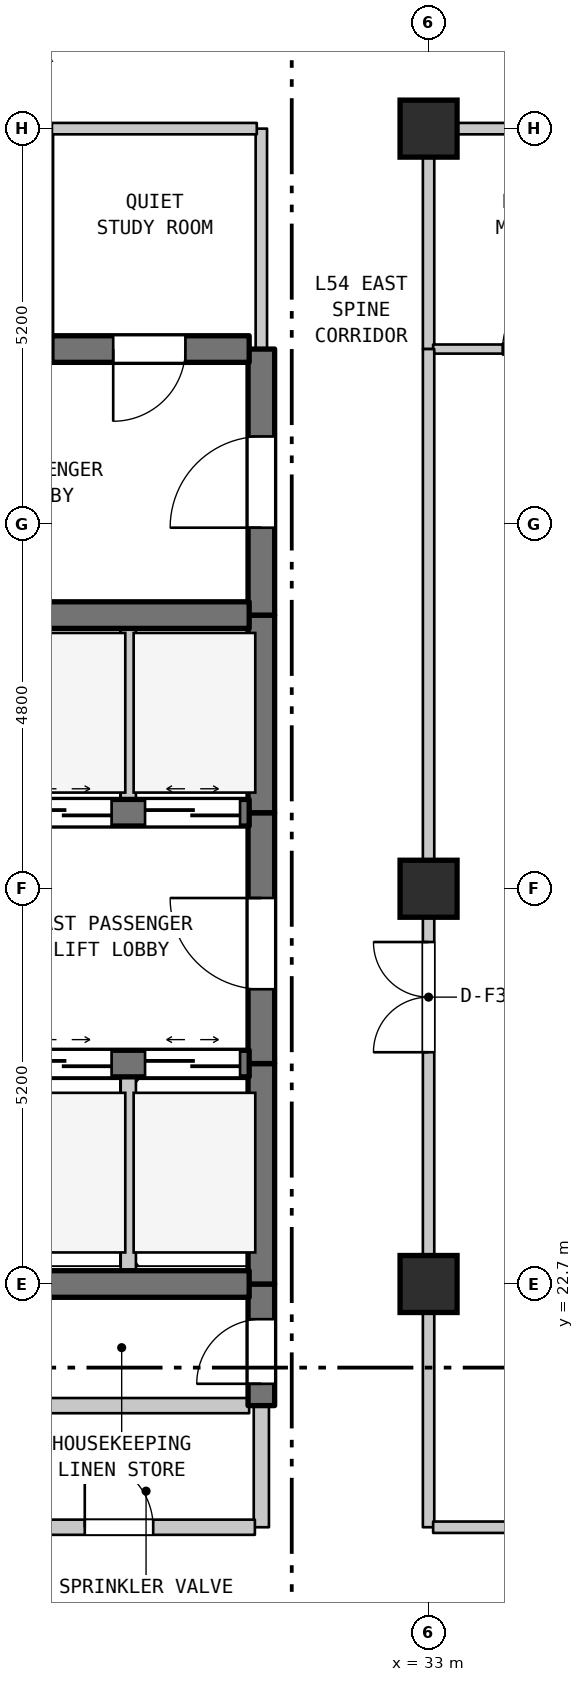
"""IFC4 building model, lengths in metres.
Left out: names, types, materials, properties, quantities, classifications, styles, units other than length and angle.
Written with IfcOpenShell. Run it as: python <this file> out.ifc"""

import sys

from ifc_helpers import new_model, si_unit, direction, frame, frame_2d, origin, origin_2d, place, context, subcontext, project, spatial, rectangle, extrude, element, fill, save


model = new_model("IFC4")
c1 = context("Model", 3, precision=1e-05, world=origin(), true_north=direction((0.0, 1.0)))
c2 = subcontext(c1, "Body", "Model", "MODEL_VIEW")
j1 = project(units=[si_unit("LENGTHUNIT", "METRE"), si_unit("PLANEANGLEUNIT", "RADIAN")], contexts=[c1])
p1 = place(None, origin())
s1 = spatial("IfcSite", under=j1, at=p1, CompositionType="ELEMENT")
p2 = place(p1, origin())
s2 = spatial("IfcBuilding", under=s1, at=p2, CompositionType="ELEMENT")
p3 = place(p2, frame((0.0, 0.0, 218.0)))
s3 = spatial("IfcBuildingStorey", under=s2, at=p3, CompositionType="ELEMENT", Elevation=218.0)
for number, where, z_axis, x_axis in (
    (1, (33.0, 22.7, 0.0), (0.0, 0.0, 1.0), (1.0, 0.0, 0.0)),
    (2, (33.0, 27.9, 0.0), (0.0, 0.0, 1.0), (1.0, 0.0, 0.0)),
    (3, (33.0, 37.9, 0.0), (0.0, 0.0, 1.0), (1.0, 0.0, 0.0)),
):
    element("IfcColumn", number, at=place(p3, frame(where, z_axis=z_axis, x_axis=x_axis)), inside=s3, PredefinedType="COLUMN", context=c2, shape_type="SweptSolid", body=[
        extrude(rectangle(XDim=0.75, YDim=0.75, at=origin_2d()), origin(), (0.0, 0.0, 1.0), 4.8),
    ])
p4 = place(p3, frame((28.0, 35.0, 0.0), z_axis=(0.0, 0.0, 1.0), x_axis=(0.0, 1.0, 0.0)))
e4 = element("IfcWall", 4, at=p4, inside=s3, PredefinedType="PARTITIONING", context=c2, shape_type="SweptSolid", body=[
    extrude(rectangle(XDim=2.9, YDim=0.12, at=frame_2d((1.45, 0.0))), origin(), (0.0, 0.0, 1.0), 4.49),
])
p5 = place(p3, frame((29.05, 22.7, 0.0), z_axis=(0.0, 0.0, 1.0), x_axis=(0.0, 1.0, 0.0)))
e5 = element("IfcWall", 5, at=p5, inside=s3, PredefinedType="STANDARD", context=c2, shape_type="SweptSolid", body=[
    extrude(rectangle(XDim=2.9, YDim=0.2, at=frame_2d((1.45, 0.0))), origin(), (0.0, 0.0, 1.0), 4.49),
])
p6 = place(p3, frame((29.05, 28.9, 0.0), z_axis=(0.0, 0.0, 1.0), x_axis=(0.0, 1.0, 0.0)))
e6 = element("IfcWall", 6, at=p6, inside=s3, PredefinedType="STANDARD", context=c2, shape_type="SweptSolid", body=[
    extrude(rectangle(XDim=2.6, YDim=0.2, at=frame_2d((1.3, 0.0))), origin(), (0.0, 0.0, 1.0), 4.49),
])
p7 = place(p3, frame((30.8, 19.5, 0.0), z_axis=(0.0, 0.0, 1.0), x_axis=(0.0, 1.0, 0.0)))
e7 = element("IfcWall", 7, at=p7, inside=s3, PredefinedType="STANDARD", context=c2, shape_type="SweptSolid", body=[
    extrude(rectangle(XDim=1.6, YDim=0.2, at=frame_2d((0.8, 0.0))), origin(), (0.0, 0.0, 1.0), 4.49),
])
p8 = place(p3, frame((30.8, 21.1, 0.0), z_axis=(0.0, 0.0, 1.0), x_axis=(0.0, 1.0, 0.0)))
e8 = element("IfcWall", 8, at=p8, inside=s3, PredefinedType="SHEAR", context=c2, shape_type="SweptSolid", body=[
    extrude(rectangle(XDim=1.6, YDim=0.35, at=frame_2d((0.8, 0.0))), origin(), (0.0, 0.0, 1.0), 4.49),
])
p9 = place(p8, frame((0.287, 0.0, 0.0)))
e9 = element("IfcOpeningElement", 9, at=p9, cuts=e8, PredefinedType="OPENING", context=c2, shape_type="SweptSolid", body=[
    extrude(rectangle(XDim=0.85, YDim=2.1, at=frame_2d((0.425, 1.05))), frame((0.0, 0.185, 0.0), z_axis=(0.0, -1.0, 0.0), x_axis=(1.0, 0.0, 0.0)), (0.0, 0.0, 1.0), 0.37),
])
p10 = place(p3, frame((30.8, 22.7, 0.0), z_axis=(0.0, 0.0, 1.0), x_axis=(0.0, 1.0, 0.0)))
e10 = element("IfcWall", 10, at=p10, inside=s3, PredefinedType="SHEAR", context=c2, shape_type="SweptSolid", body=[
    extrude(rectangle(XDim=2.9, YDim=0.35, at=frame_2d((1.45, 0.0))), origin(), (0.0, 0.0, 1.0), 4.49),
])
p11 = place(p3, frame((30.8, 25.6, 0.0), z_axis=(0.0, 0.0, 1.0), x_axis=(0.0, 1.0, 0.0)))
e11 = element("IfcWall", 11, at=p11, inside=s3, PredefinedType="SHEAR", context=c2, shape_type="SweptSolid", body=[
    extrude(rectangle(XDim=3.3, YDim=0.35, at=frame_2d((1.65, 0.0))), origin(), (0.0, 0.0, 1.0), 4.49),
])
p12 = place(p11, frame((0.978, 0.0, 0.0)))
e12 = element("IfcOpeningElement", 12, at=p12, cuts=e11, PredefinedType="OPENING", context=c2, shape_type="SweptSolid", body=[
    extrude(rectangle(XDim=1.2, YDim=2.2, at=frame_2d((0.6, 1.1))), frame((0.0, 0.185, 0.0), z_axis=(0.0, -1.0, 0.0), x_axis=(1.0, 0.0, 0.0)), (0.0, 0.0, 1.0), 0.37),
])
p13 = place(p3, frame((30.8, 28.9, 0.0), z_axis=(0.0, 0.0, 1.0), x_axis=(0.0, 1.0, 0.0)))
e13 = element("IfcWall", 13, at=p13, inside=s3, PredefinedType="SHEAR", context=c2, shape_type="SweptSolid", body=[
    extrude(rectangle(XDim=2.6, YDim=0.35, at=frame_2d((1.3, 0.0))), origin(), (0.0, 0.0, 1.0), 4.49),
])
p14 = place(p3, frame((30.8, 31.5, 0.0), z_axis=(0.0, 0.0, 1.0), x_axis=(0.0, 1.0, 0.0)))
e14 = element("IfcWall", 14, at=p14, inside=s3, PredefinedType="SHEAR", context=c2, shape_type="SweptSolid", body=[
    extrude(rectangle(XDim=3.5, YDim=0.35, at=frame_2d((1.75, 0.0))), origin(), (0.0, 0.0, 1.0), 4.49),
])
p15 = place(p14, frame((1.15, 0.0, 0.0)))
e15 = element("IfcOpeningElement", 15, at=p15, cuts=e14, PredefinedType="OPENING", context=c2, shape_type="SweptSolid", body=[
    extrude(rectangle(XDim=1.2, YDim=2.2, at=frame_2d((0.6, 1.1))), frame((0.0, 0.185, 0.0), z_axis=(0.0, -1.0, 0.0), x_axis=(1.0, 0.0, 0.0)), (0.0, 0.0, 1.0), 0.37),
])
p16 = place(p3, frame((30.8, 35.0, 0.0), z_axis=(0.0, 0.0, 1.0), x_axis=(0.0, 1.0, 0.0)))
e16 = element("IfcWall", 16, at=p16, inside=s3, PredefinedType="STANDARD", context=c2, shape_type="SweptSolid", body=[
    extrude(rectangle(XDim=2.9, YDim=0.15, at=frame_2d((1.45, 0.0))), origin(), (0.0, 0.0, 1.0), 4.49),
])
p17 = place(p3, frame((33.0, 19.5, 0.0), z_axis=(0.0, 0.0, 1.0), x_axis=(0.0, 1.0, 0.0)))
e17 = element("IfcWall", 17, at=p17, inside=s3, PredefinedType="STANDARD", context=c2, shape_type="SweptSolid", body=[
    extrude(rectangle(XDim=8.4, YDim=0.15, at=frame_2d((4.2, 0.0))), origin(), (0.0, 0.0, 1.0), 4.09),
])
p18 = place(p17, frame((6.249, 0.0, 0.0)))
e18 = element("IfcOpeningElement", 18, at=p18, cuts=e17, PredefinedType="OPENING", context=c2, shape_type="SweptSolid", body=[
    extrude(rectangle(XDim=1.45, YDim=2.2, at=frame_2d((0.725, 1.1))), frame((0.0, 0.085, 0.0), z_axis=(0.0, -1.0, 0.0), x_axis=(1.0, 0.0, 0.0)), (0.0, 0.0, 1.0), 0.17),
])
p19 = place(p3, frame((33.0, 35.0, 0.0), z_axis=(0.0, 0.0, 1.0), x_axis=(0.0, 1.0, 0.0)))
e19 = element("IfcWall", 19, at=p19, inside=s3, PredefinedType="STANDARD", context=c2, shape_type="SweptSolid", body=[
    extrude(rectangle(XDim=2.9, YDim=0.15, at=frame_2d((1.45, 0.0))), origin(), (0.0, 0.0, 1.0), 3.99),
])
p20 = place(p3, frame((27.285, 19.5, 0.0), z_axis=(0.0, 0.0, 1.0), x_axis=(1.0, 0.0, 0.0)))
e20 = element("IfcWall", 20, at=p20, inside=s3, PredefinedType="STANDARD", context=c2, shape_type="SweptSolid", body=[
    extrude(rectangle(XDim=3.43, YDim=0.2, at=frame_2d((1.715, 0.0))), origin(), (0.0, 0.0, 1.0), 4.49),
])
p21 = place(p20, frame((1.192, 0.0, 0.0)))
e21 = element("IfcOpeningElement", 21, at=p21, cuts=e20, PredefinedType="OPENING", context=c2, shape_type="SweptSolid", body=[
    extrude(rectangle(XDim=0.9, YDim=2.15, at=frame_2d((0.45, 1.075))), frame((0.0, 0.11, 0.0), z_axis=(0.0, -1.0, 0.0), x_axis=(1.0, 0.0, 0.0)), (0.0, 0.0, 1.0), 0.22),
])
p22 = place(p3, frame((33.06, 19.5, 0.0), z_axis=(0.0, 0.0, 1.0), x_axis=(1.0, 0.0, 0.0)))
e22 = element("IfcWall", 22, at=p22, inside=s3, PredefinedType="STANDARD", context=c2, shape_type="SweptSolid", body=[
    extrude(rectangle(XDim=21.58, YDim=0.15, at=frame_2d((10.79, 0.0))), origin(), (0.0, 0.0, 1.0), 4.49),
])
p23 = place(p3, frame((27.285, 21.1, 0.0), z_axis=(0.0, 0.0, 1.0), x_axis=(1.0, 0.0, 0.0)))
e23 = element("IfcWall", 23, at=p23, inside=s3, PredefinedType="STANDARD", context=c2, shape_type="SweptSolid", body=[
    extrude(rectangle(XDim=3.355, YDim=0.2, at=frame_2d((1.677, 0.0))), origin(), (0.0, 0.0, 1.0), 4.49),
])
p24 = place(p3, frame((27.46, 22.7, 0.0), z_axis=(0.0, 0.0, 1.0), x_axis=(1.0, 0.0, 0.0)))
e24 = element("IfcWall", 24, at=p24, inside=s3, PredefinedType="SHEAR", context=c2, shape_type="SweptSolid", body=[
    extrude(rectangle(XDim=3.18, YDim=0.35, at=frame_2d((1.59, 0.0))), origin(), (0.0, 0.0, 1.0), 4.49),
])
p25 = place(p3, frame((27.46, 25.6, 0.0), z_axis=(0.0, 0.0, 1.0), x_axis=(1.0, 0.0, 0.0)))
e25 = element("IfcWall", 25, at=p25, inside=s3, PredefinedType="SHEAR", context=c2, shape_type="SweptSolid", body=[
    extrude(rectangle(XDim=3.18, YDim=0.35, at=frame_2d((1.59, 0.0))), origin(), (0.0, 0.0, 1.0), 4.49),
])
p26 = place(p25, frame((0.12, 0.0, 0.0)))
e26 = element("IfcOpeningElement", 26, at=p26, cuts=e25, PredefinedType="OPENING", context=c2, shape_type="SweptSolid", body=[
    extrude(rectangle(XDim=1.25, YDim=2.2, at=frame_2d((0.625, 1.1))), frame((0.0, 0.185, 0.0), z_axis=(0.0, -1.0, 0.0), x_axis=(1.0, 0.0, 0.0)), (0.0, 0.0, 1.0), 0.37),
])
p27 = place(p25, frame((1.81, 0.0, 0.0)))
e27 = element("IfcOpeningElement", 27, at=p27, cuts=e25, PredefinedType="OPENING", context=c2, shape_type="SweptSolid", body=[
    extrude(rectangle(XDim=1.25, YDim=2.2, at=frame_2d((0.625, 1.1))), frame((0.0, 0.185, 0.0), z_axis=(0.0, -1.0, 0.0), x_axis=(1.0, 0.0, 0.0)), (0.0, 0.0, 1.0), 0.37),
])
p28 = place(p3, frame((27.46, 28.9, 0.0), z_axis=(0.0, 0.0, 1.0), x_axis=(1.0, 0.0, 0.0)))
e28 = element("IfcWall", 28, at=p28, inside=s3, PredefinedType="SHEAR", context=c2, shape_type="SweptSolid", body=[
    extrude(rectangle(XDim=3.18, YDim=0.35, at=frame_2d((1.59, 0.0))), origin(), (0.0, 0.0, 1.0), 4.49),
])
p29 = place(p28, frame((0.12, 0.0, 0.0)))
e29 = element("IfcOpeningElement", 29, at=p29, cuts=e28, PredefinedType="OPENING", context=c2, shape_type="SweptSolid", body=[
    extrude(rectangle(XDim=1.25, YDim=2.2, at=frame_2d((0.625, 1.1))), frame((0.0, 0.185, 0.0), z_axis=(0.0, -1.0, 0.0), x_axis=(1.0, 0.0, 0.0)), (0.0, 0.0, 1.0), 0.37),
])
p30 = place(p28, frame((1.81, 0.0, 0.0)))
e30 = element("IfcOpeningElement", 30, at=p30, cuts=e28, PredefinedType="OPENING", context=c2, shape_type="SweptSolid", body=[
    extrude(rectangle(XDim=1.25, YDim=2.2, at=frame_2d((0.625, 1.1))), frame((0.0, 0.185, 0.0), z_axis=(0.0, -1.0, 0.0), x_axis=(1.0, 0.0, 0.0)), (0.0, 0.0, 1.0), 0.37),
])
p31 = place(p3, frame((27.46, 31.5, 0.0), z_axis=(0.0, 0.0, 1.0), x_axis=(1.0, 0.0, 0.0)))
e31 = element("IfcWall", 31, at=p31, inside=s3, PredefinedType="SHEAR", context=c2, shape_type="SweptSolid", body=[
    extrude(rectangle(XDim=3.18, YDim=0.35, at=frame_2d((1.59, 0.0))), origin(), (0.0, 0.0, 1.0), 4.49),
])
p32 = place(p3, frame((28.045, 35.0, 0.0), z_axis=(0.0, 0.0, 1.0), x_axis=(1.0, 0.0, 0.0)))
e32 = element("IfcWall", 32, at=p32, inside=s3, PredefinedType="SHEAR", context=c2, shape_type="SweptSolid", body=[
    extrude(rectangle(XDim=2.595, YDim=0.35, at=frame_2d((1.297, 0.0))), origin(), (0.0, 0.0, 1.0), 4.49),
])
p33 = place(p32, frame((0.806, 0.0, 0.0)))
e33 = element("IfcOpeningElement", 33, at=p33, cuts=e32, PredefinedType="OPENING", context=c2, shape_type="SweptSolid", body=[
    extrude(rectangle(XDim=0.95, YDim=2.15, at=frame_2d((0.475, 1.075))), frame((0.0, 0.185, 0.0), z_axis=(0.0, -1.0, 0.0), x_axis=(1.0, 0.0, 0.0)), (0.0, 0.0, 1.0), 0.37),
])
p34 = place(p3, frame((33.06, 35.0, 0.0), z_axis=(0.0, 0.0, 1.0), x_axis=(1.0, 0.0, 0.0)))
e34 = element("IfcWall", 34, at=p34, inside=s3, PredefinedType="PARTITIONING", context=c2, shape_type="SweptSolid", body=[
    extrude(rectangle(XDim=5.595, YDim=0.12, at=frame_2d((2.797, 0.0))), origin(), (0.0, 0.0, 1.0), 4.49),
])
p35 = place(p34, frame((0.915, 0.0, 0.0)))
e35 = element("IfcOpeningElement", 35, at=p35, cuts=e34, PredefinedType="OPENING", context=c2, shape_type="SweptSolid", body=[
    extrude(rectangle(XDim=0.9, YDim=2.1, at=frame_2d((0.45, 1.05))), frame((0.0, 0.07, 0.0), z_axis=(0.0, -1.0, 0.0), x_axis=(1.0, 0.0, 0.0)), (0.0, 0.0, 1.0), 0.14),
])
p36 = place(p34, frame((3.615, 0.0, 0.0)))
e36 = element("IfcOpeningElement", 36, at=p36, cuts=e34, PredefinedType="OPENING", context=c2, shape_type="SweptSolid", body=[
    extrude(rectangle(XDim=0.9, YDim=2.1, at=frame_2d((0.45, 1.05))), frame((0.0, 0.07, 0.0), z_axis=(0.0, -1.0, 0.0), x_axis=(1.0, 0.0, 0.0)), (0.0, 0.0, 1.0), 0.14),
])
p37 = place(p3, frame((28.045, 37.9, 0.0), z_axis=(0.0, 0.0, 1.0), x_axis=(1.0, 0.0, 0.0)))
e37 = element("IfcWall", 37, at=p37, inside=s3, PredefinedType="STANDARD", context=c2, shape_type="SweptSolid", body=[
    extrude(rectangle(XDim=2.695, YDim=0.15, at=frame_2d((1.348, 0.0))), origin(), (0.0, 0.0, 1.0), 3.99),
])
p38 = place(p3, frame((33.06, 37.9, 0.0), z_axis=(0.0, 0.0, 1.0), x_axis=(1.0, 0.0, 0.0)))
e38 = element("IfcWall", 38, at=p38, inside=s3, PredefinedType="STANDARD", context=c2, shape_type="SweptSolid", body=[
    extrude(rectangle(XDim=5.595, YDim=0.15, at=frame_2d((2.797, 0.0))), origin(), (0.0, 0.0, 1.0), 4.49),
])
p39 = place(p3, frame((33.0, 27.9, 0.0), z_axis=(0.0, 0.0, 1.0), x_axis=(0.0, 1.0, 0.0)))
e39 = element("IfcWall", 39, at=p39, inside=s3, PredefinedType="STANDARD", context=c2, shape_type="SweptSolid", body=[
    extrude(rectangle(XDim=7.1, YDim=0.15, at=frame_2d((3.55, 0.0))), origin(), (0.0, 0.0, 1.0), 3.99),
])
p40 = place(p9, origin())
e40 = element("IfcDoor", 40, at=p40, inside=s3, OperationType="SINGLE_SWING_LEFT", PredefinedType="DOOR", context=c2, shape_type="SweptSolid", body=[
    extrude(rectangle(XDim=0.85, YDim=2.1, at=frame_2d((0.425, 1.05))), frame((0.0, 0.025, 0.0), z_axis=(0.0, -1.0, 0.0), x_axis=(1.0, 0.0, 0.0)), (0.0, 0.0, 1.0), 0.05),
])
fill(e9, e40)
p41 = place(p12, origin())
e41 = element("IfcDoor", 41, at=p41, inside=s3, OperationType="SINGLE_SWING_RIGHT", PredefinedType="DOOR", context=c2, shape_type="SweptSolid", body=[
    extrude(rectangle(XDim=1.2, YDim=2.2, at=frame_2d((0.6, 1.1))), frame((0.0, 0.025, 0.0), z_axis=(0.0, -1.0, 0.0), x_axis=(1.0, 0.0, 0.0)), (0.0, 0.0, 1.0), 0.05),
])
fill(e12, e41)
p42 = place(p15, origin())
e42 = element("IfcDoor", 42, at=p42, inside=s3, OperationType="SINGLE_SWING_LEFT", PredefinedType="DOOR", context=c2, shape_type="SweptSolid", body=[
    extrude(rectangle(XDim=1.2, YDim=2.2, at=frame_2d((0.6, 1.1))), frame((0.0, 0.025, 0.0), z_axis=(0.0, -1.0, 0.0), x_axis=(1.0, 0.0, 0.0)), (0.0, 0.0, 1.0), 0.05),
])
fill(e15, e42)
p43 = place(p18, origin())
e43 = element("IfcDoor", 43, at=p43, inside=s3, OperationType="DOUBLE_DOOR_SINGLE_SWING", PredefinedType="DOOR", context=c2, shape_type="SweptSolid", body=[
    extrude(rectangle(XDim=1.45, YDim=2.2, at=frame_2d((0.725, 1.1))), frame((0.0, 0.025, 0.0), z_axis=(0.0, -1.0, 0.0), x_axis=(1.0, 0.0, 0.0)), (0.0, 0.0, 1.0), 0.05),
])
fill(e18, e43)
p44 = place(p21, origin())
e44 = element("IfcDoor", 44, at=p44, inside=s3, OperationType="SINGLE_SWING_LEFT", PredefinedType="DOOR", context=c2, shape_type="SweptSolid", body=[
    extrude(rectangle(XDim=0.9, YDim=2.15, at=frame_2d((0.45, 1.075))), frame((0.0, 0.025, 0.0), z_axis=(0.0, -1.0, 0.0), x_axis=(1.0, 0.0, 0.0)), (0.0, 0.0, 1.0), 0.05),
])
fill(e21, e44)
p45 = place(p26, origin())
e45 = element("IfcDoor", 45, at=p45, inside=s3, OperationType="DOUBLE_DOOR_SLIDING", PredefinedType="DOOR", context=c2, shape_type="SweptSolid", body=[
    extrude(rectangle(XDim=1.25, YDim=2.2, at=frame_2d((0.625, 1.1))), frame((0.0, 0.025, 0.0), z_axis=(0.0, -1.0, 0.0), x_axis=(1.0, 0.0, 0.0)), (0.0, 0.0, 1.0), 0.05),
])
fill(e26, e45)
p46 = place(p27, origin())
e46 = element("IfcDoor", 46, at=p46, inside=s3, OperationType="DOUBLE_DOOR_SLIDING", PredefinedType="DOOR", context=c2, shape_type="SweptSolid", body=[
    extrude(rectangle(XDim=1.25, YDim=2.2, at=frame_2d((0.625, 1.1))), frame((0.0, 0.025, 0.0), z_axis=(0.0, -1.0, 0.0), x_axis=(1.0, 0.0, 0.0)), (0.0, 0.0, 1.0), 0.05),
])
fill(e27, e46)
p47 = place(p29, origin())
e47 = element("IfcDoor", 47, at=p47, inside=s3, OperationType="DOUBLE_DOOR_SLIDING", PredefinedType="DOOR", context=c2, shape_type="SweptSolid", body=[
    extrude(rectangle(XDim=1.25, YDim=2.2, at=frame_2d((0.625, 1.1))), frame((0.0, 0.025, 0.0), z_axis=(0.0, -1.0, 0.0), x_axis=(1.0, 0.0, 0.0)), (0.0, 0.0, 1.0), 0.05),
])
fill(e29, e47)
p48 = place(p30, origin())
e48 = element("IfcDoor", 48, at=p48, inside=s3, OperationType="DOUBLE_DOOR_SLIDING", PredefinedType="DOOR", context=c2, shape_type="SweptSolid", body=[
    extrude(rectangle(XDim=1.25, YDim=2.2, at=frame_2d((0.625, 1.1))), frame((0.0, 0.025, 0.0), z_axis=(0.0, -1.0, 0.0), x_axis=(1.0, 0.0, 0.0)), (0.0, 0.0, 1.0), 0.05),
])
fill(e30, e48)
p49 = place(p33, frame((0.95, 0.0, 0.0), z_axis=(0.0, 0.0, 1.0), x_axis=(-1.0, 0.0, 0.0)))
e49 = element("IfcDoor", 49, at=p49, inside=s3, OperationType="SINGLE_SWING_LEFT", PredefinedType="DOOR", context=c2, shape_type="SweptSolid", body=[
    extrude(rectangle(XDim=0.95, YDim=2.15, at=frame_2d((0.475, 1.075))), frame((0.0, 0.025, 0.0), z_axis=(0.0, -1.0, 0.0), x_axis=(1.0, 0.0, 0.0)), (0.0, 0.0, 1.0), 0.05),
])
fill(e33, e49)
p50 = place(p35, origin())
e50 = element("IfcDoor", 50, at=p50, inside=s3, OperationType="SINGLE_SWING_RIGHT", PredefinedType="DOOR", context=c2, shape_type="SweptSolid", body=[
    extrude(rectangle(XDim=0.9, YDim=2.1, at=frame_2d((0.45, 1.05))), frame((0.0, 0.025, 0.0), z_axis=(0.0, -1.0, 0.0), x_axis=(1.0, 0.0, 0.0)), (0.0, 0.0, 1.0), 0.05),
])
fill(e35, e50)
save(model, sys.argv[1])
